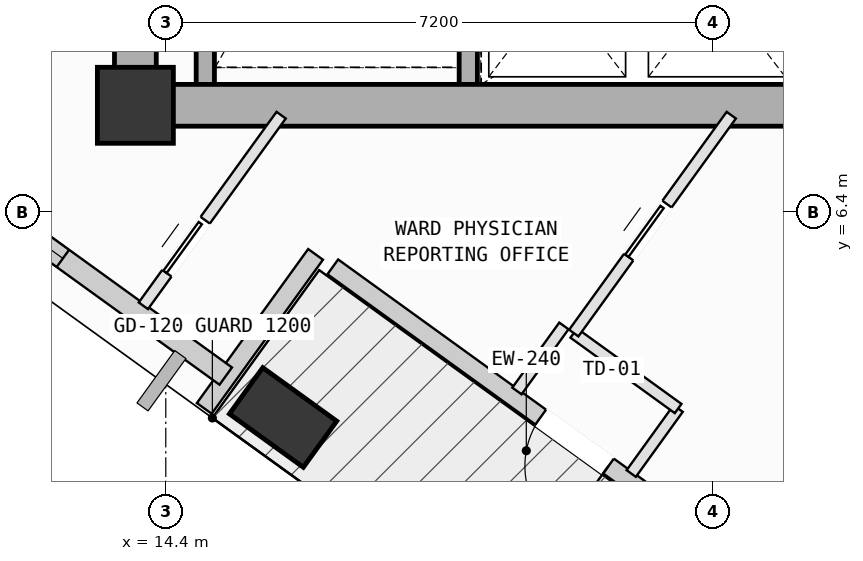
"""IFC4 building model, lengths in metres.
Left out: names, types, materials, properties, quantities, classifications, styles, units other than length and angle.
Written with IfcOpenShell. Run it as: python <this file> out.ifc"""

import sys

from ifc_helpers import new_model, si_unit, direction, frame, frame_2d, origin, origin_2d, place, context, subcontext, project, spatial, rectangle, extrude, element, fill, save


model = new_model("IFC4")
c1 = context("Model", 3, precision=1e-05, world=origin(), true_north=direction((0.0, 1.0)))
c2 = subcontext(c1, "Body", "Model", "MODEL_VIEW")
j1 = project(units=[si_unit("LENGTHUNIT", "METRE"), si_unit("PLANEANGLEUNIT", "RADIAN")], contexts=[c1])
p1 = place(None, origin())
s1 = spatial("IfcSite", under=j1, at=p1, CompositionType="ELEMENT")
p2 = place(p1, origin())
s2 = spatial("IfcBuilding", under=s1, at=p2, CompositionType="ELEMENT")
p3 = place(p2, frame((0.0, 0.0, 255.2)))
s3 = spatial("IfcBuildingStorey", under=s2, at=p3, CompositionType="ELEMENT", Elevation=255.2)
p4 = place(p3, frame((14.0, 7.8, 0.0), z_axis=(0.0, 0.0, 1.0), x_axis=(1.0, 0.0, 0.0)))
e1 = element("IfcColumn", 1, at=p4, inside=s3, PredefinedType="COLUMN", context=c2, shape_type="SweptSolid", body=[
    extrude(rectangle(XDim=1.0, YDim=1.0, at=origin_2d()), origin(), (0.0, 0.0, 1.0), 4.0),
])
p5 = place(p3, frame((15.943, 3.692, 0.002), z_axis=(0.087525830484, -0.071987264184, 0.993557780299), x_axis=(-0.964292743084, -0.256387070129, 0.066371499197)))
e2 = element("IfcColumn", 2, at=p5, inside=s3, PredefinedType="COLUMN", context=c2, shape_type="SweptSolid", body=[
    extrude(rectangle(XDim=1.2, YDim=0.75, at=origin_2d()), origin(), (0.0, 0.0, 1.0), 4.022),
])
p6 = place(p3, frame((22.239, 1.598, 0.0), z_axis=(0.0, 0.0, 1.0), x_axis=(-0.810564518145, 0.585649350656, 0.0)))
e3 = element("IfcWall", 3, at=p6, inside=s3, PredefinedType="SOLIDWALL", context=c2, shape_type="SweptSolid", body=[
    extrude(rectangle(XDim=6.96, YDim=0.24, at=frame_2d((3.48, 0.0))), origin(), (0.0, 0.0, 1.0), 3.265),
])
p7 = place(p6, frame((2.485, 0.0, 0.0)))
e4 = element("IfcOpeningElement", 4, at=p7, cuts=e3, PredefinedType="OPENING", context=c2, shape_type="SweptSolid", body=[
    extrude(rectangle(XDim=1.1, YDim=2.15, at=frame_2d((0.55, 1.075))), frame((0.0, 0.13, 0.0), z_axis=(0.0, -1.0, 0.0), x_axis=(1.0, 0.0, 0.0)), (0.0, 0.0, 1.0), 0.26),
])
p8 = place(p3, frame((16.371, 5.838, 0.0), z_axis=(0.0, 0.0, 1.0), x_axis=(-0.585718716233, -0.810514395587, 0.0)))
e5 = element("IfcWall", 5, at=p8, inside=s3, PredefinedType="SOLIDWALL", context=c2, shape_type="SweptSolid", body=[
    extrude(rectangle(XDim=2.5, YDim=0.24, at=frame_2d((1.25, 0.0))), origin(), (0.0, 0.0, 1.0), 3.265),
])
p9 = place(p3, frame((15.189, 4.237, 0.0), z_axis=(0.0, 0.0, 1.0), x_axis=(-0.810568140664, 0.585644336898, 0.0)))
e6 = element("IfcWall", 6, at=p9, inside=s3, PredefinedType="SOLIDWALL", context=c2, shape_type="SweptSolid", body=[
    extrude(rectangle(XDim=5.101, YDim=0.28, at=frame_2d((2.55, 0.0))), origin(), (0.0, 0.0, 1.0), 3.245),
])
p10 = place(p9, frame((2.644, 0.0, 0.75)))
e7 = element("IfcOpeningElement", 7, at=p10, cuts=e6, PredefinedType="OPENING", context=c2, shape_type="SweptSolid", body=[
    extrude(rectangle(XDim=1.6, YDim=1.95, at=frame_2d((0.8, 0.975))), frame((0.0, 0.15, 0.0), z_axis=(0.0, -1.0, 0.0), x_axis=(1.0, 0.0, 0.0)), (0.0, 0.0, 1.0), 0.3),
])
for number, where, z_axis, x_axis in (
    (8, (18.38, 15.12, 0.0), (0.0, 0.0, 1.0), (0.0, -1.0, 0.0)),
    (9, (14.92, 8.075, 0.0), (0.0, 0.0, 1.0), (0.0, 1.0, 0.0)),
):
    element("IfcWall", number, at=place(p3, frame(where, z_axis=z_axis, x_axis=x_axis)), inside=s3, PredefinedType="SOLIDWALL", context=c2, shape_type="SweptSolid", body=[
        extrude(rectangle(XDim=7.045, YDim=0.24, at=frame_2d((3.522, 0.0))), origin(), (0.0, 0.0, 1.0), 3.78),
    ])
p11 = place(p3, frame((14.0, 7.8, 0.0), z_axis=(0.0, 0.0, 1.0), x_axis=(1.0, 0.0, 0.0)))
e10 = element("IfcWall", 10, at=p11, inside=s3, PredefinedType="SHEAR", context=c2, shape_type="SweptSolid", body=[
    extrude(rectangle(XDim=10.8, YDim=0.55, at=frame_2d((5.4, 0.0))), origin(), (0.0, 0.0, 1.0), 3.78),
])
p12 = place(p3, frame((14.0, 16.8, 0.0), z_axis=(0.0, 0.0, 1.0), x_axis=(0.0, -1.0, 0.0)))
e11 = element("IfcWall", 11, at=p12, inside=s3, PredefinedType="SHEAR", context=c2, shape_type="SweptSolid", body=[
    extrude(rectangle(XDim=9.0, YDim=0.55, at=frame_2d((4.5, 0.0))), origin(), (0.0, 0.0, 1.0), 3.78),
])
p13 = place(p3, frame((20.524, 2.955, 0.0), z_axis=(0.0, 0.0, 1.0), x_axis=(0.585304564063, 0.810813521894, 0.0)))
e12 = element("IfcWall", 12, at=p13, inside=s3, PredefinedType="PARTITIONING", context=c2, shape_type="SweptSolid", body=[
    extrude(rectangle(XDim=1.054, YDim=0.15, at=frame_2d((0.527, 0.0))), origin(), (0.0, 0.0, 1.0), 3.78),
])
p14 = place(p3, frame((21.141, 3.81, 0.0), z_axis=(0.0, 0.0, 1.0), x_axis=(-0.810321939163, 0.58598494427, 0.0)))
e13 = element("IfcWall", 13, at=p14, inside=s3, PredefinedType="PARTITIONING", context=c2, shape_type="SweptSolid", body=[
    extrude(rectangle(XDim=1.694, YDim=0.15, at=frame_2d((0.847, 0.0))), origin(), (0.0, 0.0, 1.0), 3.415),
])
p15 = place(p3, frame((19.768, 4.803, 0.0), z_axis=(0.0, 0.0, 1.0), x_axis=(0.585760155667, 0.810484447743, 0.0)))
e14 = element("IfcWall", 14, at=p15, inside=s3, PredefinedType="PARTITIONING", context=c2, shape_type="SweptSolid", body=[
    extrude(rectangle(XDim=3.537, YDim=0.15, at=frame_2d((1.769, 0.0))), origin(), (0.0, 0.0, 1.0), 3.78),
])
p16 = place(p15, frame((1.234, 0.0, 0.0)))
e15 = element("IfcOpeningElement", 15, at=p16, cuts=e14, PredefinedType="OPENING", context=c2, shape_type="SweptSolid", body=[
    extrude(rectangle(XDim=0.86, YDim=2.06, at=frame_2d((0.43, 1.03))), frame((0.0, 0.085, 0.0), z_axis=(0.0, -1.0, 0.0), x_axis=(1.0, 0.0, 0.0)), (0.0, 0.0, 1.0), 0.17),
])
p17 = place(p3, frame((14.105, 5.162, 0.0), z_axis=(0.0, 0.0, 1.0), x_axis=(0.585870719432, 0.810404528684, 0.0)))
e16 = element("IfcWall", 16, at=p17, inside=s3, PredefinedType="PARTITIONING", context=c2, shape_type="SweptSolid", body=[
    extrude(rectangle(XDim=3.094, YDim=0.15, at=frame_2d((1.547, 0.0))), origin(), (0.0, 0.0, 1.0), 3.78),
])
p18 = place(p17, frame((0.529, 0.0, 0.0)))
e17 = element("IfcOpeningElement", 17, at=p18, cuts=e16, PredefinedType="OPENING", context=c2, shape_type="SweptSolid", body=[
    extrude(rectangle(XDim=0.86, YDim=2.06, at=frame_2d((0.43, 1.03))), frame((0.0, 0.085, 0.0), z_axis=(0.0, -1.0, 0.0), x_axis=(1.0, 0.0, 0.0)), (0.0, 0.0, 1.0), 0.17),
])
p19 = place(p3, frame((19.638, 4.897, 0.0), z_axis=(0.0, 0.0, 1.0), x_axis=(-0.585321668989, -0.810801174032, 0.0)))
e18 = element("IfcWall", 18, at=p19, inside=s3, PredefinedType="PARTITIONING", context=c2, shape_type="SweptSolid", body=[
    extrude(rectangle(XDim=1.056, YDim=0.15, at=frame_2d((0.528, 0.0))), origin(), (0.0, 0.0, 1.0), 3.78),
])
p20 = place(p3, frame((10.215, 7.973, 0.0), z_axis=(0.0, 0.0, 1.0), x_axis=(0.585568437411, 0.810622973465, 0.0)))
e19 = element("IfcWall", 19, at=p20, inside=s3, PredefinedType="PARTITIONING", context=c2, shape_type="SweptSolid", body=[
    extrude(rectangle(XDim=5.951, YDim=0.15, at=frame_2d((2.976, 0.0))), origin(), (0.0, 0.0, 1.0), 3.78),
])
p21 = place(p20, frame((2.546, 0.0, 0.0)))
e20 = element("IfcOpeningElement", 20, at=p21, cuts=e19, PredefinedType="OPENING", context=c2, shape_type="SweptSolid", body=[
    extrude(rectangle(XDim=0.86, YDim=2.06, at=frame_2d((0.43, 1.03))), frame((0.0, 0.085, 0.0), z_axis=(0.0, -1.0, 0.0), x_axis=(1.0, 0.0, 0.0)), (0.0, 0.0, 1.0), 0.17),
])
p22 = place(p7, origin())
e21 = element("IfcDoor", 21, at=p22, inside=s3, OperationType="SINGLE_SWING_LEFT", PredefinedType="DOOR", context=c2, shape_type="SweptSolid", body=[
    extrude(rectangle(XDim=1.1, YDim=2.15, at=frame_2d((0.55, 1.075))), frame((0.0, 0.025, 0.0), z_axis=(0.0, -1.0, 0.0), x_axis=(1.0, 0.0, 0.0)), (0.0, 0.0, 1.0), 0.05),
])
fill(e4, e21)
p23 = place(p10, origin())
e22 = element("IfcWindow", 22, at=p23, inside=s3, PartitioningType="SINGLE_PANEL", PredefinedType="WINDOW", context=c2, shape_type="SweptSolid", body=[
    extrude(rectangle(XDim=1.6, YDim=1.95, at=frame_2d((0.8, 0.975))), frame((0.0, 0.03, 0.0), z_axis=(0.0, -1.0, 0.0), x_axis=(1.0, 0.0, 0.0)), (0.0, 0.0, 1.0), 0.06),
])
fill(e7, e22)
p24 = place(p18, origin())
e23 = element("IfcDoor", 23, at=p24, inside=s3, OperationType="SLIDING_TO_LEFT", PredefinedType="DOOR", context=c2, shape_type="SweptSolid", body=[
    extrude(rectangle(XDim=0.86, YDim=2.06, at=frame_2d((0.43, 1.03))), frame((0.0, 0.025, 0.0), z_axis=(0.0, -1.0, 0.0), x_axis=(1.0, 0.0, 0.0)), (0.0, 0.0, 1.0), 0.05),
])
fill(e17, e23)
p25 = place(p16, origin())
e24 = element("IfcDoor", 24, at=p25, inside=s3, OperationType="SLIDING_TO_LEFT", PredefinedType="DOOR", context=c2, shape_type="SweptSolid", body=[
    extrude(rectangle(XDim=0.86, YDim=2.06, at=frame_2d((0.43, 1.03))), frame((0.0, 0.025, 0.0), z_axis=(0.0, -1.0, 0.0), x_axis=(1.0, 0.0, 0.0)), (0.0, 0.0, 1.0), 0.05),
])
fill(e15, e24)
save(model, sys.argv[1])
